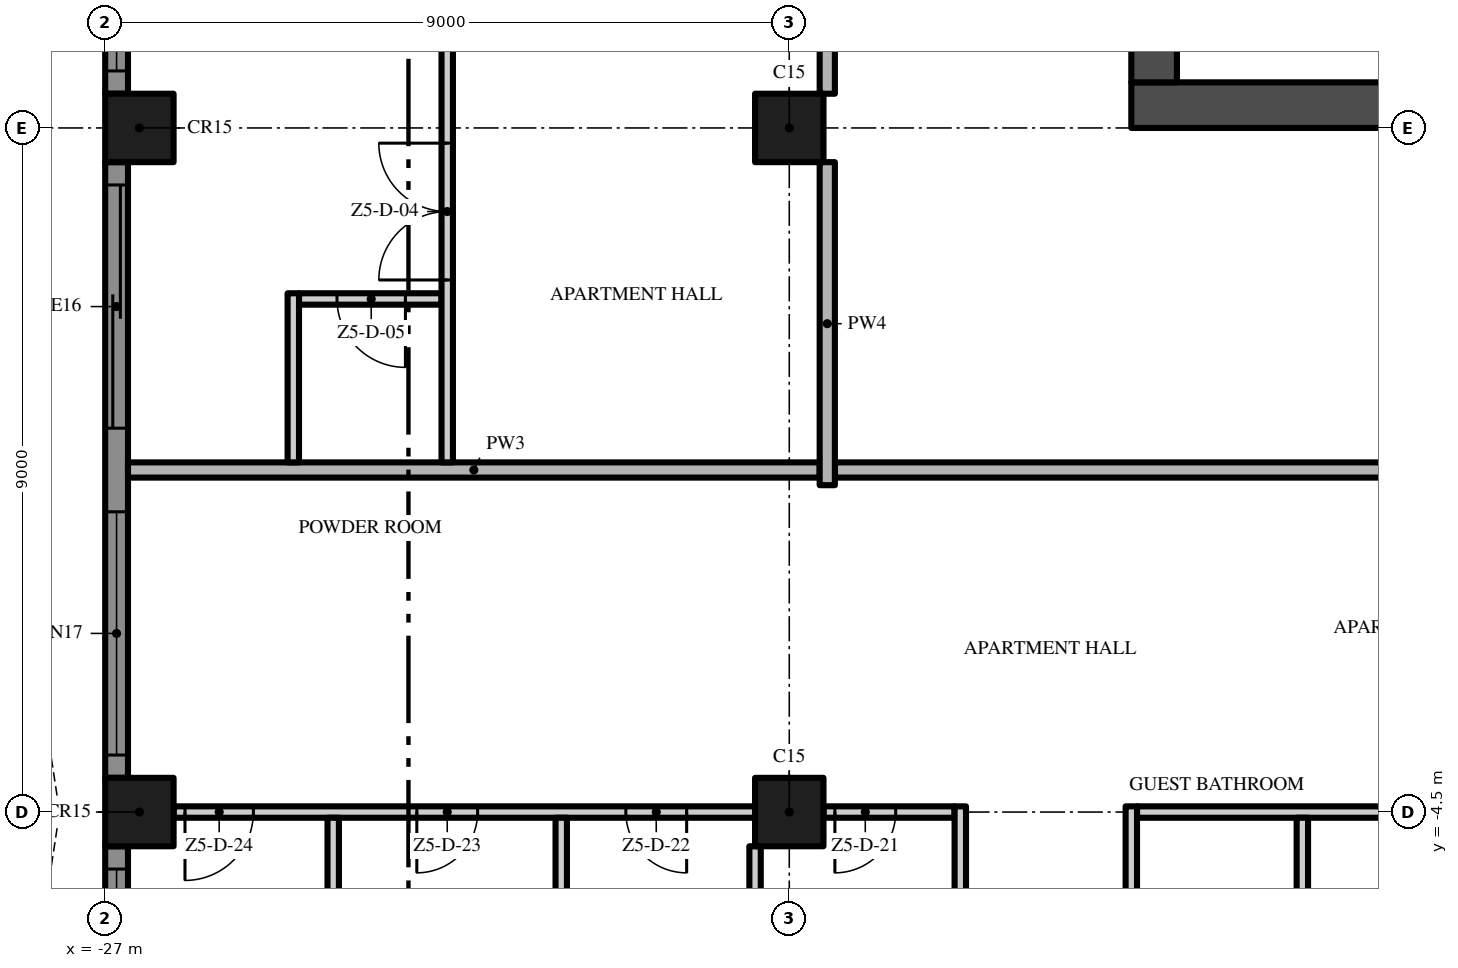
"""IFC4 building model, lengths in metres.
Left out: names, types, materials, properties, quantities, classifications, styles, units other than length and angle.
Written with IfcOpenShell. Run it as: python <this file> out.ifc"""

import sys

from ifc_helpers import new_model, si_unit, direction, frame, frame_2d, origin, origin_2d, place, context, subcontext, project, spatial, polyline, rectangle, outline, extrude, element, fill, save


model = new_model("IFC4")
c1 = context("Model", 3, precision=1e-05, world=origin(), true_north=direction((0.0, 1.0)))
c2 = subcontext(c1, "Body", "Model", "MODEL_VIEW")
j1 = project(units=[si_unit("LENGTHUNIT", "METRE"), si_unit("PLANEANGLEUNIT", "RADIAN")], contexts=[c1])
p1 = place(None, origin())
s1 = spatial("IfcSite", under=j1, at=p1, CompositionType="ELEMENT")
p2 = place(p1, origin())
s2 = spatial("IfcBuilding", under=s1, at=p2, CompositionType="ELEMENT")
p3 = place(p2, frame((0.0, 0.0, 280.6)))
s3 = spatial("IfcBuildingStorey", under=s2, at=p3, CompositionType="ELEMENT", Elevation=280.6)
p4 = place(p3, frame((-13.5, 4.8, -0.3), z_axis=(0.0, 0.0, 1.0), x_axis=(1.0, 0.0, 0.0)))
e1 = element("IfcWall", 1, at=p4, inside=s3, PredefinedType="SHEAR", context=c2, shape_type="SweptSolid", body=[
    extrude(rectangle(XDim=27.0, YDim=0.6, at=frame_2d((13.5, 0.0))), origin(), (0.0, 0.0, 1.0), 3.8),
])
p5 = place(p4, frame((12.0, 0.0, 0.3)))
e2 = element("IfcOpeningElement", 2, at=p5, cuts=e1, PredefinedType="OPENING", context=c2, shape_type="SweptSolid", body=[
    extrude(rectangle(XDim=3.0, YDim=2.4, at=frame_2d((1.5, 1.2))), frame((0.0, 0.31, 0.0), z_axis=(0.0, -1.0, 0.0), x_axis=(1.0, 0.0, 0.0)), (0.0, 0.0, 1.0), 0.62),
])
p6 = place(p4, frame((4.9, 0.0, 0.3)))
e3 = element("IfcOpeningElement", 3, at=p6, cuts=e1, PredefinedType="OPENING", context=c2, shape_type="SweptSolid", body=[
    extrude(rectangle(XDim=1.2, YDim=2.2, at=frame_2d((0.6, 1.1))), frame((0.0, 0.31, 0.0), z_axis=(0.0, -1.0, 0.0), x_axis=(1.0, 0.0, 0.0)), (0.0, 0.0, 1.0), 0.62),
])
p7 = place(p4, frame((20.75, 0.0, 0.3)))
e4 = element("IfcOpeningElement", 4, at=p7, cuts=e1, PredefinedType="OPENING", context=c2, shape_type="SweptSolid", body=[
    extrude(rectangle(XDim=1.5, YDim=2.2, at=frame_2d((0.75, 1.1))), frame((0.0, 0.31, 0.0), z_axis=(0.0, -1.0, 0.0), x_axis=(1.0, 0.0, 0.0)), (0.0, 0.0, 1.0), 0.62),
])
p8 = place(p4, frame((17.4, 0.0, 0.3)))
e5 = element("IfcOpeningElement", 5, at=p8, cuts=e1, PredefinedType="OPENING", context=c2, shape_type="SweptSolid", body=[
    extrude(rectangle(XDim=1.2, YDim=2.2, at=frame_2d((0.6, 1.1))), frame((0.0, 0.31, 0.0), z_axis=(0.0, -1.0, 0.0), x_axis=(1.0, 0.0, 0.0)), (0.0, 0.0, 1.0), 0.62),
])
p9 = place(p3, frame((-13.2, 21.9, -0.3), z_axis=(0.0, 0.0, 1.0), x_axis=(0.0, -1.0, 0.0)))
e6 = element("IfcWall", 6, at=p9, inside=s3, PredefinedType="SHEAR", context=c2, shape_type="SweptSolid", body=[
    extrude(rectangle(XDim=16.8, YDim=0.6, at=frame_2d((8.4, 0.0))), origin(), (0.0, 0.0, 1.0), 3.8),
])
p10 = place(p9, frame((9.3, 0.0, 0.3)))
e7 = element("IfcOpeningElement", 7, at=p10, cuts=e6, PredefinedType="OPENING", context=c2, shape_type="SweptSolid", body=[
    extrude(rectangle(XDim=1.2, YDim=2.2, at=frame_2d((0.6, 1.1))), frame((0.0, 0.31, 0.0), z_axis=(0.0, -1.0, 0.0), x_axis=(1.0, 0.0, 0.0)), (0.0, 0.0, 1.0), 0.62),
])
for number, where, z_axis, x_axis in (
    (8, (-18.0, -4.5, 0.0), (0.0, 0.0, 1.0), (1.0, 0.0, 0.0)),
    (9, (-18.0, 4.5, 0.0), (0.0, 0.0, 1.0), (1.0, 0.0, 0.0)),
    (10, (-26.55, -4.5, 0.0), (0.0, 0.0, 1.0), (1.0, 0.0, 0.0)),
    (11, (-26.55, 4.5, 0.0), (0.0, 0.0, 1.0), (1.0, 0.0, 0.0)),
):
    element("IfcColumn", number, at=place(p3, frame(where, z_axis=z_axis, x_axis=x_axis)), inside=s3, PredefinedType="COLUMN", context=c2, shape_type="SweptSolid", body=[
        extrude(rectangle(XDim=0.9, YDim=0.9, at=origin_2d()), origin(), (0.0, 0.0, 1.0), 3.5),
    ])
p11 = place(p3, frame((-26.85, 4.95, 0.0), z_axis=(0.0, 0.0, 1.0), x_axis=(0.0, 1.0, 0.0)))
e12 = element("IfcWall", 12, at=p11, inside=s3, PredefinedType="SOLIDWALL", context=c2, shape_type="SweptSolid", body=[
    extrude(rectangle(XDim=8.1, YDim=0.3, at=frame_2d((4.05, 0.0))), origin(), (0.0, 0.0, 1.0), 3.5),
])
p12 = place(p11, frame((4.6, 0.0, 0.45)))
e13 = element("IfcOpeningElement", 13, at=p12, cuts=e12, PredefinedType="OPENING", context=c2, shape_type="SweptSolid", body=[
    extrude(rectangle(XDim=3.2, YDim=2.65, at=frame_2d((1.6, 1.325))), frame((0.0, 0.16, 0.0), z_axis=(0.0, -1.0, 0.0), x_axis=(1.0, 0.0, 0.0)), (0.0, 0.0, 1.0), 0.32),
])
p13 = place(p11, frame((0.3, 0.0, 0.45)))
e14 = element("IfcOpeningElement", 14, at=p13, cuts=e12, PredefinedType="OPENING", context=c2, shape_type="SweptSolid", body=[
    extrude(rectangle(XDim=3.2, YDim=2.65, at=frame_2d((1.6, 1.325))), frame((0.0, 0.16, 0.0), z_axis=(0.0, -1.0, 0.0), x_axis=(1.0, 0.0, 0.0)), (0.0, 0.0, 1.0), 0.32),
])
p14 = place(p3, frame((-26.85, -4.05, 0.0), z_axis=(0.0, 0.0, 1.0), x_axis=(0.0, 1.0, 0.0)))
e15 = element("IfcWall", 15, at=p14, inside=s3, PredefinedType="SOLIDWALL", context=c2, shape_type="SweptSolid", body=[
    extrude(rectangle(XDim=8.1, YDim=0.3, at=frame_2d((4.05, 0.0))), origin(), (0.0, 0.0, 1.0), 3.5),
])
p15 = place(p14, frame((4.6, 0.0, 0.0)))
e16 = element("IfcOpeningElement", 16, at=p15, cuts=e15, PredefinedType="OPENING", context=c2, shape_type="SweptSolid", body=[
    extrude(rectangle(XDim=3.2, YDim=2.4, at=frame_2d((1.6, 1.2))), frame((0.0, 0.16, 0.0), z_axis=(0.0, -1.0, 0.0), x_axis=(1.0, 0.0, 0.0)), (0.0, 0.0, 1.0), 0.32),
])
p16 = place(p14, frame((0.3, 0.0, 0.45)))
e17 = element("IfcOpeningElement", 17, at=p16, cuts=e15, PredefinedType="OPENING", context=c2, shape_type="SweptSolid", body=[
    extrude(rectangle(XDim=3.2, YDim=2.65, at=frame_2d((1.6, 1.325))), frame((0.0, 0.16, 0.0), z_axis=(0.0, -1.0, 0.0), x_axis=(1.0, 0.0, 0.0)), (0.0, 0.0, 1.0), 0.32),
])
p17 = place(p3, frame((-26.85, -13.05, 0.0), z_axis=(0.0, 0.0, 1.0), x_axis=(0.0, 1.0, 0.0)))
e18 = element("IfcWall", 18, at=p17, inside=s3, PredefinedType="SOLIDWALL", context=c2, shape_type="SweptSolid", body=[
    extrude(rectangle(XDim=8.1, YDim=0.3, at=frame_2d((4.05, 0.0))), origin(), (0.0, 0.0, 1.0), 3.5),
])
p18 = place(p17, frame((4.6, 0.0, 0.45)))
e19 = element("IfcOpeningElement", 19, at=p18, cuts=e18, PredefinedType="OPENING", context=c2, shape_type="SweptSolid", body=[
    extrude(rectangle(XDim=3.2, YDim=2.65, at=frame_2d((1.6, 1.325))), frame((0.0, 0.16, 0.0), z_axis=(0.0, -1.0, 0.0), x_axis=(1.0, 0.0, 0.0)), (0.0, 0.0, 1.0), 0.32),
])
p19 = place(p17, frame((0.3, 0.0, 0.0)))
e20 = element("IfcOpeningElement", 20, at=p19, cuts=e18, PredefinedType="OPENING", context=c2, shape_type="SweptSolid", body=[
    extrude(rectangle(XDim=3.2, YDim=2.4, at=frame_2d((1.6, 1.2))), frame((0.0, 0.16, 0.0), z_axis=(0.0, -1.0, 0.0), x_axis=(1.0, 0.0, 0.0)), (0.0, 0.0, 1.0), 0.32),
])
p20 = place(p3, origin())
e21 = element("IfcWall", 21, at=p20, inside=s3, PredefinedType="USERDEFINED", context=c2, shape_type="SweptSolid", body=[
    extrude(outline(polyline([(-30.0, 18.0), (-29.771, 16.5), (-29.171, 15.0), (-28.429, 13.5), (-27.829, 12.0), (-27.6, 10.5), (-27.829, 9.0), (-28.429, 7.5), (-29.171, 6.0), (-29.771, 4.5), (-30.0, 3.0), (-29.771, 1.5), (-29.171, 0.0), (-28.429, -1.5), (-27.829, -3.0), (-27.6, -4.5), (-27.829, -6.0), (-28.429, -7.5), (-29.171, -9.0), (-29.771, -10.5), (-30.0, -12.0), (-29.771, -13.5), (-29.171, -15.0), (-28.429, -16.5), (-27.829, -18.0), (-27.597, -17.907), (-28.201, -16.398), (-28.942, -14.898), (-29.528, -13.434), (-29.747, -12.0), (-29.528, -10.566), (-28.942, -9.102), (-28.201, -7.602), (-27.586, -6.066), (-27.347, -4.5), (-27.586, -2.934), (-28.201, -1.398), (-28.942, 0.102), (-29.528, 1.566), (-29.747, 3.0), (-29.528, 4.434), (-28.942, 5.898), (-28.201, 7.398), (-27.586, 8.934), (-27.347, 10.5), (-27.586, 12.066), (-28.201, 13.602), (-28.942, 15.102), (-29.528, 16.566), (-29.753, 18.038), (-30.0, 18.0)])), origin(), (0.0, 0.0, 1.0), 0.9),
])
p21 = place(p3, frame((-18.45, -4.5, 0.0), z_axis=(0.0, 0.0, 1.0), x_axis=(-1.0, 0.0, 0.0)))
e22 = element("IfcWall", 22, at=p21, inside=s3, PredefinedType="PARTITIONING", context=c2, shape_type="SweptSolid", body=[
    extrude(rectangle(XDim=7.65, YDim=0.15, at=frame_2d((3.825, 0.0))), origin(), (0.0, 0.0, 1.0), 3.5),
])
p22 = place(p21, frame((0.9, 0.0, 0.0)))
e23 = element("IfcOpeningElement", 23, at=p22, cuts=e22, PredefinedType="OPENING", context=c2, shape_type="SweptSolid", body=[
    extrude(rectangle(XDim=0.8, YDim=2.0, at=frame_2d((0.4, 1.0))), frame((0.0, 0.085, 0.0), z_axis=(0.0, -1.0, 0.0), x_axis=(1.0, 0.0, 0.0)), (0.0, 0.0, 1.0), 0.17),
])
p23 = place(p21, frame((3.65, 0.0, 0.0)))
e24 = element("IfcOpeningElement", 24, at=p23, cuts=e22, PredefinedType="OPENING", context=c2, shape_type="SweptSolid", body=[
    extrude(rectangle(XDim=0.8, YDim=2.0, at=frame_2d((0.4, 1.0))), frame((0.0, 0.085, 0.0), z_axis=(0.0, -1.0, 0.0), x_axis=(1.0, 0.0, 0.0)), (0.0, 0.0, 1.0), 0.17),
])
p24 = place(p21, frame((6.6, 0.0, 0.0)))
e25 = element("IfcOpeningElement", 25, at=p24, cuts=e22, PredefinedType="OPENING", context=c2, shape_type="SweptSolid", body=[
    extrude(rectangle(XDim=0.9, YDim=2.1, at=frame_2d((0.45, 1.05))), frame((0.0, 0.085, 0.0), z_axis=(0.0, -1.0, 0.0), x_axis=(1.0, 0.0, 0.0)), (0.0, 0.0, 1.0), 0.17),
])
p25 = place(p3, frame((-15.825, -4.5, 0.0), z_axis=(0.0, 0.0, 1.0), x_axis=(-1.0, 0.0, 0.0)))
e26 = element("IfcWall", 26, at=p25, inside=s3, PredefinedType="PARTITIONING", context=c2, shape_type="SweptSolid", body=[
    extrude(rectangle(XDim=1.725, YDim=0.15, at=frame_2d((0.863, 0.0))), origin(), (0.0, 0.0, 1.0), 3.5),
])
p26 = place(p25, frame((0.775, 0.0, 0.0)))
e27 = element("IfcOpeningElement", 27, at=p26, cuts=e26, PredefinedType="OPENING", context=c2, shape_type="SweptSolid", body=[
    extrude(rectangle(XDim=0.8, YDim=2.0, at=frame_2d((0.4, 1.0))), frame((0.0, 0.085, 0.0), z_axis=(0.0, -1.0, 0.0), x_axis=(1.0, 0.0, 0.0)), (0.0, 0.0, 1.0), 0.17),
])
p27 = place(p3, frame((-13.425, -4.5, 0.0), z_axis=(0.0, 0.0, 1.0), x_axis=(1.0, 0.0, 0.0)))
e28 = element("IfcWall", 28, at=p27, inside=s3, PredefinedType="PARTITIONING", context=c2, shape_type="SweptSolid", body=[
    extrude(rectangle(XDim=3.975, YDim=0.15, at=frame_2d((1.988, 0.0))), origin(), (0.0, 0.0, 1.0), 3.5),
])
p28 = place(p3, frame((17.4, 0.0, 0.0), z_axis=(0.0, 0.0, 1.0), x_axis=(-1.0, 0.0, 0.0)))
e29 = element("IfcWall", 29, at=p28, inside=s3, PredefinedType="PARTITIONING", context=c2, shape_type="SweptSolid", body=[
    extrude(rectangle(XDim=34.8, YDim=0.2, at=frame_2d((17.4, 0.0))), origin(), (0.0, 0.0, 1.0), 3.5),
])
p29 = place(p28, frame((25.65, 0.0, 0.0)))
e30 = element("IfcOpeningElement", 30, at=p29, cuts=e29, PredefinedType="OPENING", context=c2, shape_type="SweptSolid", body=[
    extrude(rectangle(XDim=1.5, YDim=2.4, at=frame_2d((0.75, 1.2))), frame((0.0, 0.11, 0.0), z_axis=(0.0, -1.0, 0.0), x_axis=(1.0, 0.0, 0.0)), (0.0, 0.0, 1.0), 0.22),
])
p30 = place(p28, frame((7.65, 0.0, 0.0)))
e31 = element("IfcOpeningElement", 31, at=p30, cuts=e29, PredefinedType="OPENING", context=c2, shape_type="SweptSolid", body=[
    extrude(rectangle(XDim=1.5, YDim=2.4, at=frame_2d((0.75, 1.2))), frame((0.0, 0.11, 0.0), z_axis=(0.0, -1.0, 0.0), x_axis=(1.0, 0.0, 0.0)), (0.0, 0.0, 1.0), 0.22),
])
p31 = place(p3, frame((-26.7, 0.0, 0.0), z_axis=(0.0, 0.0, 1.0), x_axis=(1.0, 0.0, 0.0)))
e32 = element("IfcWall", 32, at=p31, inside=s3, PredefinedType="PARTITIONING", context=c2, shape_type="SweptSolid", body=[
    extrude(rectangle(XDim=9.1, YDim=0.2, at=frame_2d((4.55, 0.0))), origin(), (0.0, 0.0, 1.0), 3.5),
])
p32 = place(p3, frame((-22.575, 2.25, 0.0), z_axis=(0.0, 0.0, 1.0), x_axis=(-1.0, 0.0, 0.0)))
e33 = element("IfcWall", 33, at=p32, inside=s3, PredefinedType="PARTITIONING", context=c2, shape_type="SweptSolid", body=[
    extrude(rectangle(XDim=1.875, YDim=0.15, at=frame_2d((0.938, 0.0))), origin(), (0.0, 0.0, 1.0), 3.5),
])
p33 = place(p32, frame((0.475, 0.0, 0.0)))
e34 = element("IfcOpeningElement", 34, at=p33, cuts=e33, PredefinedType="OPENING", context=c2, shape_type="SweptSolid", body=[
    extrude(rectangle(XDim=0.9, YDim=2.1, at=frame_2d((0.45, 1.05))), frame((0.0, 0.085, 0.0), z_axis=(0.0, -1.0, 0.0), x_axis=(1.0, 0.0, 0.0)), (0.0, 0.0, 1.0), 0.17),
])
p34 = place(p3, frame((-24.525, 0.1, 0.0), z_axis=(0.0, 0.0, 1.0), x_axis=(0.0, 1.0, 0.0)))
e35 = element("IfcWall", 35, at=p34, inside=s3, PredefinedType="PARTITIONING", context=c2, shape_type="SweptSolid", body=[
    extrude(rectangle(XDim=2.225, YDim=0.15, at=frame_2d((1.113, 0.0))), origin(), (0.0, 0.0, 1.0), 3.5),
])
p35 = place(p3, frame((-24.0, -8.925, 0.0), z_axis=(0.0, 0.0, 1.0), x_axis=(0.0, 1.0, 0.0)))
e36 = element("IfcWall", 36, at=p35, inside=s3, PredefinedType="PARTITIONING", context=c2, shape_type="SweptSolid", body=[
    extrude(rectangle(XDim=4.35, YDim=0.15, at=frame_2d((2.175, 0.0))), origin(), (0.0, 0.0, 1.0), 3.5),
])
p36 = place(p3, frame((-22.5, 0.1, 0.0), z_axis=(0.0, 0.0, 1.0), x_axis=(0.0, 1.0, 0.0)))
e37 = element("IfcWall", 37, at=p36, inside=s3, PredefinedType="PARTITIONING", context=c2, shape_type="SweptSolid", body=[
    extrude(rectangle(XDim=17.45, YDim=0.15, at=frame_2d((8.725, 0.0))), origin(), (0.0, 0.0, 1.0), 3.5),
])
p37 = place(p36, frame((2.4, 0.0, 0.0)))
e38 = element("IfcOpeningElement", 38, at=p37, cuts=e37, PredefinedType="OPENING", context=c2, shape_type="SweptSolid", body=[
    extrude(rectangle(XDim=1.8, YDim=2.4, at=frame_2d((0.9, 1.2))), frame((0.0, 0.085, 0.0), z_axis=(0.0, -1.0, 0.0), x_axis=(1.0, 0.0, 0.0)), (0.0, 0.0, 1.0), 0.17),
])
p38 = place(p36, frame((10.65, 0.0, 0.0)))
e39 = element("IfcOpeningElement", 39, at=p38, cuts=e37, PredefinedType="OPENING", context=c2, shape_type="SweptSolid", body=[
    extrude(rectangle(XDim=1.0, YDim=2.4, at=frame_2d((0.5, 1.2))), frame((0.0, 0.085, 0.0), z_axis=(0.0, -1.0, 0.0), x_axis=(1.0, 0.0, 0.0)), (0.0, 0.0, 1.0), 0.17),
])
p39 = place(p3, frame((-21.0, -8.925, 0.0), z_axis=(0.0, 0.0, 1.0), x_axis=(0.0, 1.0, 0.0)))
e40 = element("IfcWall", 40, at=p39, inside=s3, PredefinedType="PARTITIONING", context=c2, shape_type="SweptSolid", body=[
    extrude(rectangle(XDim=4.35, YDim=0.15, at=frame_2d((2.175, 0.0))), origin(), (0.0, 0.0, 1.0), 3.5),
])
p40 = place(p3, frame((-18.45, -8.925, 0.0), z_axis=(0.0, 0.0, 1.0), x_axis=(0.0, 1.0, 0.0)))
e41 = element("IfcWall", 41, at=p40, inside=s3, PredefinedType="PARTITIONING", context=c2, shape_type="SweptSolid", body=[
    extrude(rectangle(XDim=3.975, YDim=0.15, at=frame_2d((1.988, 0.0))), origin(), (0.0, 0.0, 1.0), 3.5),
])
p41 = place(p3, frame((-17.5, -0.2, 0.0), z_axis=(0.0, 0.0, 1.0), x_axis=(0.0, 1.0, 0.0)))
e42 = element("IfcWall", 42, at=p41, inside=s3, PredefinedType="PARTITIONING", context=c2, shape_type="SweptSolid", body=[
    extrude(rectangle(XDim=4.25, YDim=0.2, at=frame_2d((2.125, 0.0))), origin(), (0.0, 0.0, 1.0), 3.5),
])
p42 = place(p3, frame((-17.5, 4.95, 0.0), z_axis=(0.0, 0.0, 1.0), x_axis=(0.0, 1.0, 0.0)))
e43 = element("IfcWall", 43, at=p42, inside=s3, PredefinedType="PARTITIONING", context=c2, shape_type="SweptSolid", body=[
    extrude(rectangle(XDim=8.1, YDim=0.2, at=frame_2d((4.05, 0.0))), origin(), (0.0, 0.0, 1.0), 3.5),
])
p43 = place(p42, frame((1.2, 0.0, 0.0)))
e44 = element("IfcOpeningElement", 44, at=p43, cuts=e43, PredefinedType="OPENING", context=c2, shape_type="SweptSolid", body=[
    extrude(rectangle(XDim=1.2, YDim=2.4, at=frame_2d((0.6, 1.2))), frame((0.0, 0.11, 0.0), z_axis=(0.0, -1.0, 0.0), x_axis=(1.0, 0.0, 0.0)), (0.0, 0.0, 1.0), 0.22),
])
p44 = place(p3, frame((-15.75, -9.075, 0.0), z_axis=(0.0, 0.0, 1.0), x_axis=(0.0, 1.0, 0.0)))
e45 = element("IfcWall", 45, at=p44, inside=s3, PredefinedType="PARTITIONING", context=c2, shape_type="SweptSolid", body=[
    extrude(rectangle(XDim=4.65, YDim=0.15, at=frame_2d((2.325, 0.0))), origin(), (0.0, 0.0, 1.0), 3.5),
])
p45 = place(p3, frame((-13.5, -4.425, 0.0), z_axis=(0.0, 0.0, 1.0), x_axis=(0.0, -1.0, 0.0)))
e46 = element("IfcWall", 46, at=p45, inside=s3, PredefinedType="PARTITIONING", context=c2, shape_type="SweptSolid", body=[
    extrude(rectangle(XDim=4.65, YDim=0.15, at=frame_2d((2.325, 0.0))), origin(), (0.0, 0.0, 1.0), 3.5),
])
p46 = place(p45, frame((1.875, 0.0, 0.0)))
e47 = element("IfcOpeningElement", 47, at=p46, cuts=e46, PredefinedType="OPENING", context=c2, shape_type="SweptSolid", body=[
    extrude(rectangle(XDim=0.9, YDim=2.1, at=frame_2d((0.45, 1.05))), frame((0.0, 0.085, 0.0), z_axis=(0.0, -1.0, 0.0), x_axis=(1.0, 0.0, 0.0)), (0.0, 0.0, 1.0), 0.17),
])
p47 = place(p3, frame((-11.25, -8.925, 0.0), z_axis=(0.0, 0.0, 1.0), x_axis=(0.0, 1.0, 0.0)))
e48 = element("IfcWall", 48, at=p47, inside=s3, PredefinedType="PARTITIONING", context=c2, shape_type="SweptSolid", body=[
    extrude(rectangle(XDim=4.35, YDim=0.15, at=frame_2d((2.175, 0.0))), origin(), (0.0, 0.0, 1.0), 3.5),
])
p48 = place(p13, origin())
e49 = element("IfcWindow", 49, at=p48, inside=s3, PartitioningType="SINGLE_PANEL", PredefinedType="WINDOW", context=c2, shape_type="SweptSolid", body=[
    extrude(rectangle(XDim=3.2, YDim=2.65, at=frame_2d((1.6, 1.325))), frame((0.0, 0.03, 0.0), z_axis=(0.0, -1.0, 0.0), x_axis=(1.0, 0.0, 0.0)), (0.0, 0.0, 1.0), 0.06),
])
fill(e14, e49)
p49 = place(p15, origin())
e50 = element("IfcDoor", 50, at=p49, inside=s3, OperationType="SINGLE_SWING_LEFT", PredefinedType="DOOR", context=c2, shape_type="SweptSolid", body=[
    extrude(rectangle(XDim=3.2, YDim=2.4, at=frame_2d((1.6, 1.2))), frame((0.0, 0.025, 0.0), z_axis=(0.0, -1.0, 0.0), x_axis=(1.0, 0.0, 0.0)), (0.0, 0.0, 1.0), 0.05),
])
fill(e16, e50)
p50 = place(p16, origin())
e51 = element("IfcWindow", 51, at=p50, inside=s3, PartitioningType="SINGLE_PANEL", PredefinedType="WINDOW", context=c2, shape_type="SweptSolid", body=[
    extrude(rectangle(XDim=3.2, YDim=2.65, at=frame_2d((1.6, 1.325))), frame((0.0, 0.03, 0.0), z_axis=(0.0, -1.0, 0.0), x_axis=(1.0, 0.0, 0.0)), (0.0, 0.0, 1.0), 0.06),
])
fill(e17, e51)
p51 = place(p18, origin())
e52 = element("IfcWindow", 52, at=p51, inside=s3, PartitioningType="SINGLE_PANEL", PredefinedType="WINDOW", context=c2, shape_type="SweptSolid", body=[
    extrude(rectangle(XDim=3.2, YDim=2.65, at=frame_2d((1.6, 1.325))), frame((0.0, 0.03, 0.0), z_axis=(0.0, -1.0, 0.0), x_axis=(1.0, 0.0, 0.0)), (0.0, 0.0, 1.0), 0.06),
])
fill(e19, e52)
p52 = place(p37, origin())
e53 = element("IfcDoor", 53, at=p52, inside=s3, OperationType="DOUBLE_DOOR_SINGLE_SWING", PredefinedType="DOOR", context=c2, shape_type="SweptSolid", body=[
    extrude(rectangle(XDim=1.8, YDim=2.4, at=frame_2d((0.9, 1.2))), frame((0.0, 0.025, 0.0), z_axis=(0.0, -1.0, 0.0), x_axis=(1.0, 0.0, 0.0)), (0.0, 0.0, 1.0), 0.05),
])
fill(e38, e53)
p53 = place(p33, origin())
e54 = element("IfcDoor", 54, at=p53, inside=s3, OperationType="SINGLE_SWING_LEFT", PredefinedType="DOOR", context=c2, shape_type="SweptSolid", body=[
    extrude(rectangle(XDim=0.9, YDim=2.1, at=frame_2d((0.45, 1.05))), frame((0.0, 0.025, 0.0), z_axis=(0.0, -1.0, 0.0), x_axis=(1.0, 0.0, 0.0)), (0.0, 0.0, 1.0), 0.05),
])
fill(e34, e54)
p54 = place(p26, origin())
e55 = element("IfcDoor", 55, at=p54, inside=s3, OperationType="SINGLE_SWING_RIGHT", PredefinedType="DOOR", context=c2, shape_type="SweptSolid", body=[
    extrude(rectangle(XDim=0.8, YDim=2.0, at=frame_2d((0.4, 1.0))), frame((0.0, 0.025, 0.0), z_axis=(0.0, -1.0, 0.0), x_axis=(1.0, 0.0, 0.0)), (0.0, 0.0, 1.0), 0.05),
])
fill(e27, e55)
p55 = place(p22, origin())
e56 = element("IfcDoor", 56, at=p55, inside=s3, OperationType="SINGLE_SWING_LEFT", PredefinedType="DOOR", context=c2, shape_type="SweptSolid", body=[
    extrude(rectangle(XDim=0.8, YDim=2.0, at=frame_2d((0.4, 1.0))), frame((0.0, 0.025, 0.0), z_axis=(0.0, -1.0, 0.0), x_axis=(1.0, 0.0, 0.0)), (0.0, 0.0, 1.0), 0.05),
])
fill(e23, e56)
p56 = place(p23, origin())
e57 = element("IfcDoor", 57, at=p56, inside=s3, OperationType="SINGLE_SWING_RIGHT", PredefinedType="DOOR", context=c2, shape_type="SweptSolid", body=[
    extrude(rectangle(XDim=0.8, YDim=2.0, at=frame_2d((0.4, 1.0))), frame((0.0, 0.025, 0.0), z_axis=(0.0, -1.0, 0.0), x_axis=(1.0, 0.0, 0.0)), (0.0, 0.0, 1.0), 0.05),
])
fill(e24, e57)
p57 = place(p24, origin())
e58 = element("IfcDoor", 58, at=p57, inside=s3, OperationType="SINGLE_SWING_RIGHT", PredefinedType="DOOR", context=c2, shape_type="SweptSolid", body=[
    extrude(rectangle(XDim=0.9, YDim=2.1, at=frame_2d((0.45, 1.05))), frame((0.0, 0.025, 0.0), z_axis=(0.0, -1.0, 0.0), x_axis=(1.0, 0.0, 0.0)), (0.0, 0.0, 1.0), 0.05),
])
fill(e25, e58)
save(model, sys.argv[1])
